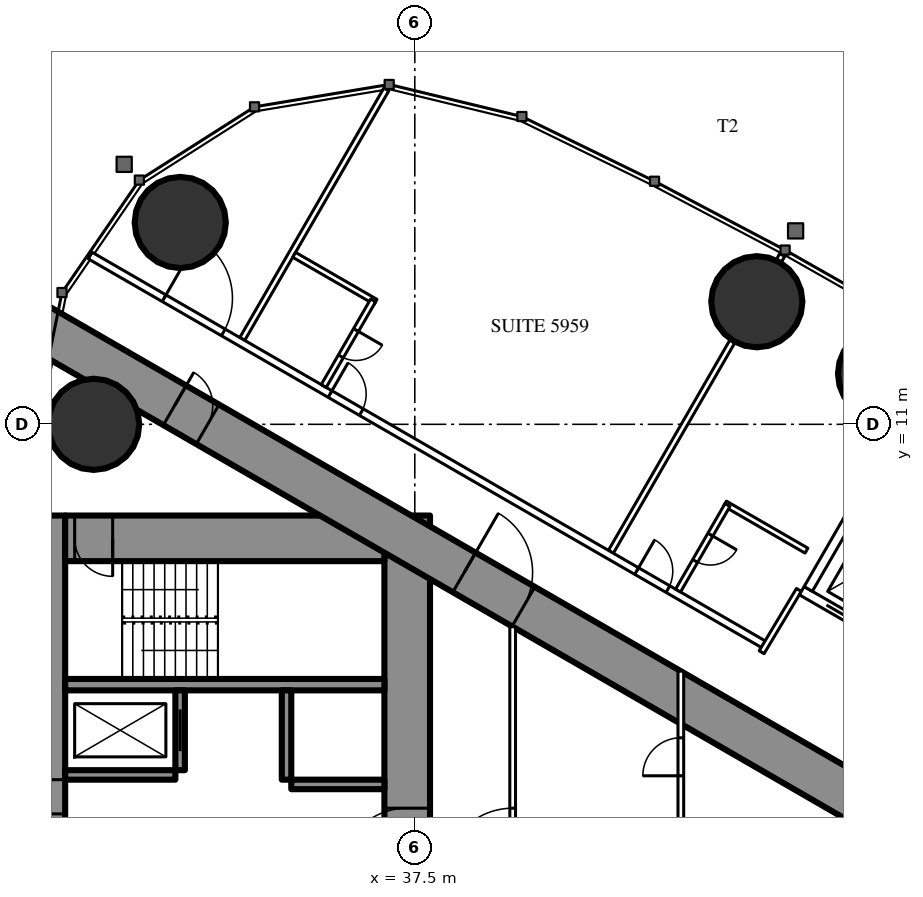
"""IFC4 building model, lengths in metres.
Left out: names, types, materials, properties, quantities, classifications, styles, units other than length and angle.
Written with IfcOpenShell. Run it as: python <this file> out.ifc"""

import sys

from ifc_helpers import new_model, si_unit, direction, frame, frame_2d, origin, origin_2d, place, context, subcontext, project, spatial, rectangle, circle, extrude, element, fill, save


model = new_model("IFC4")
c1 = context("Model", 3, precision=1e-05, world=origin(), true_north=direction((0.0, 1.0)))
c2 = subcontext(c1, "Body", "Model", "MODEL_VIEW")
j1 = project(units=[si_unit("LENGTHUNIT", "METRE"), si_unit("PLANEANGLEUNIT", "RADIAN")], contexts=[c1])
p1 = place(None, origin())
s1 = spatial("IfcSite", under=j1, at=p1, CompositionType="ELEMENT")
p2 = place(p1, origin())
s2 = spatial("IfcBuilding", under=s1, at=p2, CompositionType="ELEMENT")
p3 = place(p2, frame((0.0, 0.0, 222.5)))
s3 = spatial("IfcBuildingStorey", under=s2, at=p3, CompositionType="ELEMENT", Elevation=222.5)
for number, where, z_axis, x_axis in (
    (1, (31.328, 16.311, 0.0), (0.0, 0.0, 1.0), (1.0, 0.0, 0.0)),
    (2, (29.05, 11.0, 0.0), (0.0, 0.0, 1.0), (1.0, 0.0, 0.0)),
    (3, (49.834, 12.332, 0.0), (0.0, 0.0, 1.0), (1.0, 0.0, 0.0)),
    (4, (46.499, 14.226, 0.0), (0.0, 0.0, 1.0), (1.0, 0.0, 0.0)),
):
    element("IfcColumn", number, at=place(p3, frame(where, z_axis=z_axis, x_axis=x_axis)), inside=s3, PredefinedType="COLUMN", context=c2, shape_type="SweptSolid", body=[
        extrude(circle(Radius=1.2, at=origin_2d()), origin(), (0.0, 0.0, 1.0), 3.6),
    ])
p4 = place(p3, frame((27.9, -8.6, 0.0), z_axis=(0.0, 0.0, 1.0), x_axis=(0.0, 1.0, 0.0)))
e5 = element("IfcWall", 5, at=p4, inside=s3, PredefinedType="SHEAR", context=c2, shape_type="SweptSolid", body=[
    extrude(rectangle(XDim=17.2, YDim=0.8, at=frame_2d((8.6, 0.0))), origin(), (0.0, 0.0, 1.0), 3.6),
])
p5 = place(p4, frame((9.35, 0.0, 0.0)))
e6 = element("IfcOpeningElement", 6, at=p5, cuts=e5, PredefinedType="OPENING", context=c2, shape_type="SweptSolid", body=[
    extrude(rectangle(XDim=0.9, YDim=2.2, at=frame_2d((0.45, 1.1))), frame((0.0, 0.41, 0.0), z_axis=(0.0, -1.0, 0.0), x_axis=(1.0, 0.0, 0.0)), (0.0, 0.0, 1.0), 0.82),
])
p6 = place(p3, frame((37.3, -8.6, 0.0), z_axis=(0.0, 0.0, 1.0), x_axis=(0.0, 1.0, 0.0)))
e7 = element("IfcWall", 7, at=p6, inside=s3, PredefinedType="SHEAR", context=c2, shape_type="SweptSolid", body=[
    extrude(rectangle(XDim=17.2, YDim=1.2, at=frame_2d((8.6, 0.0))), origin(), (0.0, 0.0, 1.0), 3.6),
])
p7 = place(p6, frame((7.7, 0.0, 0.0)))
e8 = element("IfcOpeningElement", 8, at=p7, cuts=e7, PredefinedType="OPENING", context=c2, shape_type="SweptSolid", body=[
    extrude(rectangle(XDim=1.8, YDim=2.2, at=frame_2d((0.9, 1.1))), frame((0.0, 0.61, 0.0), z_axis=(0.0, -1.0, 0.0), x_axis=(1.0, 0.0, 0.0)), (0.0, 0.0, 1.0), 1.22),
])
p8 = place(p3, frame((28.3, 8.0, 0.0), z_axis=(0.0, 0.0, 1.0), x_axis=(1.0, 0.0, 0.0)))
e9 = element("IfcWall", 9, at=p8, inside=s3, PredefinedType="SHEAR", context=c2, shape_type="SweptSolid", body=[
    extrude(rectangle(XDim=8.4, YDim=1.2, at=frame_2d((4.2, 0.0))), origin(), (0.0, 0.0, 1.0), 3.6),
])
p9 = place(p8, frame((0.25, 0.0, 0.0)))
e10 = element("IfcOpeningElement", 10, at=p9, cuts=e9, PredefinedType="OPENING", context=c2, shape_type="SweptSolid", body=[
    extrude(rectangle(XDim=1.0, YDim=2.2, at=frame_2d((0.5, 1.1))), frame((0.0, 0.61, 0.0), z_axis=(0.0, -1.0, 0.0), x_axis=(1.0, 0.0, 0.0)), (0.0, 0.0, 1.0), 1.22),
])
p10 = place(p3, frame((28.3, 4.15, 0.0), z_axis=(0.0, 0.0, 1.0), x_axis=(1.0, 0.0, 0.0)))
e11 = element("IfcWall", 11, at=p10, inside=s3, PredefinedType="SHEAR", context=c2, shape_type="SweptSolid", body=[
    extrude(rectangle(XDim=8.4, YDim=0.3, at=frame_2d((4.2, 0.0))), origin(), (0.0, 0.0, 1.0), 3.6),
])
p11 = place(p3, frame((31.325, 1.9, 0.0), z_axis=(0.0, 0.0, 1.0), x_axis=(0.0, 1.0, 0.0)))
e12 = element("IfcWall", 12, at=p11, inside=s3, PredefinedType="SHEAR", context=c2, shape_type="SweptSolid", body=[
    extrude(rectangle(XDim=2.1, YDim=0.25, at=frame_2d((1.05, 0.0))), origin(), (0.0, 0.0, 1.0), 3.6),
])
p12 = place(p11, frame((0.5, 0.0, 0.0)))
e13 = element("IfcOpeningElement", 13, at=p12, cuts=e12, PredefinedType="OPENING", context=c2, shape_type="SweptSolid", body=[
    extrude(rectangle(XDim=1.1, YDim=2.2, at=frame_2d((0.55, 1.1))), frame((0.0, 0.135, 0.0), z_axis=(0.0, -1.0, 0.0), x_axis=(1.0, 0.0, 0.0)), (0.0, 0.0, 1.0), 0.27),
])
p13 = place(p3, frame((34.125, 1.65, 0.0), z_axis=(0.0, 0.0, 1.0), x_axis=(0.0, 1.0, 0.0)))
e14 = element("IfcWall", 14, at=p13, inside=s3, PredefinedType="SHEAR", context=c2, shape_type="SweptSolid", body=[
    extrude(rectangle(XDim=2.35, YDim=0.25, at=frame_2d((1.175, 0.0))), origin(), (0.0, 0.0, 1.0), 3.6),
])
p14 = place(p3, frame((28.3, 1.775, 0.0), z_axis=(0.0, 0.0, 1.0), x_axis=(1.0, 0.0, 0.0)))
e15 = element("IfcWall", 15, at=p14, inside=s3, PredefinedType="SHEAR", context=c2, shape_type="SweptSolid", body=[
    extrude(rectangle(XDim=2.9, YDim=0.25, at=frame_2d((1.45, 0.0))), origin(), (0.0, 0.0, 1.0), 3.6),
])
p15 = place(p3, frame((34.25, 1.525, 0.0), z_axis=(0.0, 0.0, 1.0), x_axis=(1.0, 0.0, 0.0)))
e16 = element("IfcWall", 16, at=p15, inside=s3, PredefinedType="SHEAR", context=c2, shape_type="SweptSolid", body=[
    extrude(rectangle(XDim=2.45, YDim=0.25, at=frame_2d((1.225, 0.0))), origin(), (0.0, 0.0, 1.0), 3.6),
])
p16 = place(p3, frame((27.2, -13.8, 0.0), z_axis=(0.0, 0.0, 1.0), x_axis=(0.866027159892, 0.499996958321, 0.0)))
e17 = element("IfcWall", 17, at=p16, inside=s3, PredefinedType="SHEAR", context=c2, shape_type="SweptSolid", body=[
    extrude(rectangle(XDim=27.947, YDim=1.2, at=frame_2d((13.973, 0.0))), origin(), (0.0, 0.0, 1.0), 3.6),
])
p17 = place(p16, frame((4.6, 0.0, 0.0)))
e18 = element("IfcOpeningElement", 18, at=p17, cuts=e17, PredefinedType="OPENING", context=c2, shape_type="SweptSolid", body=[
    extrude(rectangle(XDim=1.0, YDim=2.2, at=frame_2d((0.5, 1.1))), frame((0.0, 0.61, 0.0), z_axis=(0.0, -1.0, 0.0), x_axis=(1.0, 0.0, 0.0)), (0.0, 0.0, 1.0), 1.22),
])
p18 = place(p16, frame((13.395, 0.0, 0.0)))
e19 = element("IfcOpeningElement", 19, at=p18, cuts=e17, PredefinedType="OPENING", context=c2, shape_type="SweptSolid", body=[
    extrude(rectangle(XDim=1.8, YDim=2.2, at=frame_2d((0.9, 1.1))), frame((0.0, 0.61, 0.0), z_axis=(0.0, -1.0, 0.0), x_axis=(1.0, 0.0, 0.0)), (0.0, 0.0, 1.0), 1.22),
])
p19 = place(p3, frame((27.2, 13.8, 0.0), z_axis=(0.0, 0.0, 1.0), x_axis=(0.866024515034, -0.500001539357, 0.0)))
e20 = element("IfcWall", 20, at=p19, inside=s3, PredefinedType="SHEAR", context=c2, shape_type="SweptSolid", body=[
    extrude(rectangle(XDim=26.907, YDim=1.2, at=frame_2d((13.454, 0.0))), origin(), (0.0, 0.0, 1.0), 3.6),
])
p20 = place(p19, frame((4.6, 0.0, 0.0)))
e21 = element("IfcOpeningElement", 21, at=p20, cuts=e20, PredefinedType="OPENING", context=c2, shape_type="SweptSolid", body=[
    extrude(rectangle(XDim=1.0, YDim=2.2, at=frame_2d((0.5, 1.1))), frame((0.0, 0.61, 0.0), z_axis=(0.0, -1.0, 0.0), x_axis=(1.0, 0.0, 0.0)), (0.0, 0.0, 1.0), 1.22),
])
p21 = place(p19, frame((13.395, 0.0, 0.0)))
e22 = element("IfcOpeningElement", 22, at=p21, cuts=e20, PredefinedType="OPENING", context=c2, shape_type="SweptSolid", body=[
    extrude(rectangle(XDim=1.8, YDim=2.2, at=frame_2d((0.9, 1.1))), frame((0.0, 0.61, 0.0), z_axis=(0.0, -1.0, 0.0), x_axis=(1.0, 0.0, 0.0)), (0.0, 0.0, 1.0), 1.22),
])
p22 = place(p3, frame((32.96, 13.246, 0.0), z_axis=(0.0, 0.0, 1.0), x_axis=(0.500000236886, 0.866025267018, 0.0)))
e23 = element("IfcWall", 23, at=p22, inside=s3, PredefinedType="PARTITIONING", context=c2, shape_type="SweptSolid", body=[
    extrude(rectangle(XDim=7.583, YDim=0.15, at=frame_2d((3.791, 0.0))), origin(), (0.0, 0.0, 1.0), 3.35),
])
p23 = place(p3, frame((42.66, 7.646, 0.0), z_axis=(0.0, 0.0, 1.0), x_axis=(0.499996592859, 0.866027370889, 0.0)))
e24 = element("IfcWall", 24, at=p23, inside=s3, PredefinedType="PARTITIONING", context=c2, shape_type="SweptSolid", body=[
    extrude(rectangle(XDim=6.398, YDim=0.15, at=frame_2d((3.199, 0.0))), origin(), (0.0, 0.0, 1.0), 2.45),
])
p24 = place(p3, frame((47.079, 15.3, 0.0), z_axis=(0.0, 0.0, 1.0), x_axis=(0.499212083968, 0.866479829667, 0.0)))
e25 = element("IfcWall", 25, at=p24, inside=s3, PredefinedType="PARTITIONING", context=c2, shape_type="SweptSolid", body=[
    extrude(rectangle(XDim=0.179, YDim=0.15, at=frame_2d((0.09, 0.0))), origin(), (0.0, 0.0, 1.0), 2.45),
])
p25 = place(p3, frame((28.959, 15.44, 0.0), z_axis=(0.0, 0.0, 1.0), x_axis=(0.866028936079, -0.499993881836, 0.0)))
e26 = element("IfcWall", 26, at=p25, inside=s3, PredefinedType="PARTITIONING", context=c2, shape_type="SweptSolid", body=[
    extrude(rectangle(XDim=20.503, YDim=0.2, at=frame_2d((10.251, 0.0))), origin(), (0.0, 0.0, 1.0), 3.35),
])
p26 = place(p25, frame((16.603, 0.0, 0.0)))
e27 = element("IfcOpeningElement", 27, at=p26, cuts=e26, PredefinedType="OPENING", context=c2, shape_type="SweptSolid", body=[
    extrude(rectangle(XDim=0.95, YDim=2.2, at=frame_2d((0.475, 1.1))), frame((0.0, 0.11, 0.0), z_axis=(0.0, -1.0, 0.0), x_axis=(1.0, 0.0, 0.0)), (0.0, 0.0, 1.0), 0.22),
])
p27 = place(p25, frame((7.287, 0.0, 0.0)))
e28 = element("IfcOpeningElement", 28, at=p27, cuts=e26, PredefinedType="OPENING", context=c2, shape_type="SweptSolid", body=[
    extrude(rectangle(XDim=0.95, YDim=2.2, at=frame_2d((0.475, 1.1))), frame((0.0, 0.11, 0.0), z_axis=(0.0, -1.0, 0.0), x_axis=(1.0, 0.0, 0.0)), (0.0, 0.0, 1.0), 0.22),
])
p28 = place(p25, frame((2.244, 0.0, 0.0)))
e29 = element("IfcOpeningElement", 29, at=p28, cuts=e26, PredefinedType="OPENING", context=c2, shape_type="SweptSolid", body=[
    extrude(rectangle(XDim=1.8, YDim=2.03, at=frame_2d((0.9, 1.015))), frame((0.0, 0.11, 0.0), z_axis=(0.0, -1.0, 0.0), x_axis=(1.0, 0.0, 0.0)), (0.0, 0.0, 1.0), 0.22),
])
p29 = place(p3, frame((47.606, 6.642, 0.0), z_axis=(0.0, 0.0, 1.0), x_axis=(-0.51353662755, -0.858067673418, 0.0)))
e30 = element("IfcWall", 30, at=p29, inside=s3, PredefinedType="PARTITIONING", context=c2, shape_type="SweptSolid", body=[
    extrude(rectangle(XDim=1.91, YDim=0.15, at=frame_2d((0.955, 0.0))), origin(), (0.0, 0.0, 1.0), 3.35),
])
p30 = place(p3, frame((45.662, 8.914, 0.0), z_axis=(0.0, 0.0, 1.0), x_axis=(0.86604923931, -0.499958713387, 0.0)))
e31 = element("IfcWall", 31, at=p30, inside=s3, PredefinedType="PARTITIONING", context=c2, shape_type="SweptSolid", body=[
    extrude(rectangle(XDim=2.475, YDim=0.15, at=frame_2d((1.237, 0.0))), origin(), (0.0, 0.0, 1.0), 3.35),
])
p31 = place(p3, frame((44.427, 6.625, 0.0), z_axis=(0.0, 0.0, 1.0), x_axis=(0.500006934395, 0.866021400173, 0.0)))
e32 = element("IfcWall", 32, at=p31, inside=s3, PredefinedType="PARTITIONING", context=c2, shape_type="SweptSolid", body=[
    extrude(rectangle(XDim=2.6, YDim=0.15, at=frame_2d((1.3, 0.0))), origin(), (0.0, 0.0, 1.0), 3.35),
])
p32 = place(p31, frame((0.9, 0.0, 0.0)))
e33 = element("IfcOpeningElement", 33, at=p32, cuts=e32, PredefinedType="OPENING", context=c2, shape_type="SweptSolid", body=[
    extrude(rectangle(XDim=0.8, YDim=2.2, at=frame_2d((0.4, 1.1))), frame((0.0, 0.085, 0.0), z_axis=(0.0, -1.0, 0.0), x_axis=(1.0, 0.0, 0.0)), (0.0, 0.0, 1.0), 0.17),
])
p33 = place(p3, frame((34.325, 15.46, 0.0), z_axis=(0.0, 0.0, 1.0), x_axis=(0.866031185235, -0.4999899861, 0.0)))
e34 = element("IfcWall", 34, at=p33, inside=s3, PredefinedType="PARTITIONING", context=c2, shape_type="SweptSolid", body=[
    extrude(rectangle(XDim=2.475, YDim=0.15, at=frame_2d((1.238, 0.0))), origin(), (0.0, 0.0, 1.0), 3.35),
])
p34 = place(p3, frame((35.104, 12.008, 0.0), z_axis=(0.0, 0.0, 1.0), x_axis=(0.500047596559, 0.865997922154, 0.0)))
e35 = element("IfcWall", 35, at=p34, inside=s3, PredefinedType="PARTITIONING", context=c2, shape_type="SweptSolid", body=[
    extrude(rectangle(XDim=2.6, YDim=0.15, at=frame_2d((1.3, 0.0))), origin(), (0.0, 0.0, 1.0), 3.35),
])
p35 = place(p34, frame((0.9, 0.0, 0.0)))
e36 = element("IfcOpeningElement", 36, at=p35, cuts=e35, PredefinedType="OPENING", context=c2, shape_type="SweptSolid", body=[
    extrude(rectangle(XDim=0.8, YDim=2.2, at=frame_2d((0.4, 1.1))), frame((0.0, 0.085, 0.0), z_axis=(0.0, -1.0, 0.0), x_axis=(1.0, 0.0, 0.0)), (0.0, 0.0, 1.0), 0.17),
])
p36 = place(p3, frame((40.075, -5.674, 0.0), z_axis=(0.0, 0.0, 1.0), x_axis=(0.0, 1.0, 0.0)))
e37 = element("IfcWall", 37, at=p36, inside=s3, PredefinedType="PARTITIONING", context=c2, shape_type="SweptSolid", body=[
    extrude(rectangle(XDim=11.348, YDim=0.15, at=frame_2d((5.674, 0.0))), origin(), (0.0, 0.0, 1.0), 3.35),
])
p37 = place(p36, frame((4.774, 0.0, 0.0)))
e38 = element("IfcOpeningElement", 38, at=p37, cuts=e37, PredefinedType="OPENING", context=c2, shape_type="SweptSolid", body=[
    extrude(rectangle(XDim=1.8, YDim=2.2, at=frame_2d((0.9, 1.1))), frame((0.0, 0.085, 0.0), z_axis=(0.0, -1.0, 0.0), x_axis=(1.0, 0.0, 0.0)), (0.0, 0.0, 1.0), 0.17),
])
p38 = place(p3, frame((44.5, -4.505, 0.0), z_axis=(0.0, 0.0, 1.0), x_axis=(0.0, 1.0, 0.0)))
e39 = element("IfcWall", 39, at=p38, inside=s3, PredefinedType="PARTITIONING", context=c2, shape_type="SweptSolid", body=[
    extrude(rectangle(XDim=9.009, YDim=0.15, at=frame_2d((4.505, 0.0))), origin(), (0.0, 0.0, 1.0), 3.35),
])
p39 = place(p38, frame((1.752, 0.0, 0.0)))
e40 = element("IfcOpeningElement", 40, at=p39, cuts=e39, PredefinedType="OPENING", context=c2, shape_type="SweptSolid", body=[
    extrude(rectangle(XDim=1.0, YDim=2.2, at=frame_2d((0.5, 1.1))), frame((0.0, 0.085, 0.0), z_axis=(0.0, -1.0, 0.0), x_axis=(1.0, 0.0, 0.0)), (0.0, 0.0, 1.0), 0.17),
])
p40 = place(p38, frame((6.257, 0.0, 0.0)))
e41 = element("IfcOpeningElement", 41, at=p40, cuts=e39, PredefinedType="OPENING", context=c2, shape_type="SweptSolid", body=[
    extrude(rectangle(XDim=1.0, YDim=2.2, at=frame_2d((0.5, 1.1))), frame((0.0, 0.085, 0.0), z_axis=(0.0, -1.0, 0.0), x_axis=(1.0, 0.0, 0.0)), (0.0, 0.0, 1.0), 0.17),
])
p41 = place(p3, frame((47.681, 6.622, 0.0), z_axis=(0.0, 0.0, 1.0), x_axis=(0.86603344179, -0.499986077507, 0.0)))
e42 = element("IfcWall", 42, at=p41, inside=s3, PredefinedType="PARTITIONING", context=c2, shape_type="SweptSolid", body=[
    extrude(rectangle(XDim=6.6, YDim=0.25, at=frame_2d((3.3, 0.0))), origin(), (0.0, 0.0, 1.0), 3.35),
])
p42 = place(p41, frame((0.75, 0.0, 0.0)))
e43 = element("IfcOpeningElement", 43, at=p42, cuts=e42, PredefinedType="OPENING", context=c2, shape_type="SweptSolid", body=[
    extrude(rectangle(XDim=1.1, YDim=2.2, at=frame_2d((0.55, 1.1))), frame((0.0, 0.135, 0.0), z_axis=(0.0, -1.0, 0.0), x_axis=(1.0, 0.0, 0.0)), (0.0, 0.0, 1.0), 0.27),
])
p43 = place(p41, frame((2.75, 0.0, 0.0)))
e44 = element("IfcOpeningElement", 44, at=p43, cuts=e42, PredefinedType="OPENING", context=c2, shape_type="SweptSolid", body=[
    extrude(rectangle(XDim=1.1, YDim=2.2, at=frame_2d((0.55, 1.1))), frame((0.0, 0.135, 0.0), z_axis=(0.0, -1.0, 0.0), x_axis=(1.0, 0.0, 0.0)), (0.0, 0.0, 1.0), 0.27),
])
p44 = place(p41, frame((4.75, 0.0, 0.0)))
e45 = element("IfcOpeningElement", 45, at=p44, cuts=e42, PredefinedType="OPENING", context=c2, shape_type="SweptSolid", body=[
    extrude(rectangle(XDim=1.1, YDim=2.2, at=frame_2d((0.55, 1.1))), frame((0.0, 0.135, 0.0), z_axis=(0.0, -1.0, 0.0), x_axis=(1.0, 0.0, 0.0)), (0.0, 0.0, 1.0), 0.27),
])
p45 = place(p3, frame((47.852, 6.668, 0.0), z_axis=(0.0, 0.0, 1.0), x_axis=(0.499929347863, 0.866066190972, 0.0)))
e46 = element("IfcWall", 46, at=p45, inside=s3, PredefinedType="PARTITIONING", context=c2, shape_type="SweptSolid", body=[
    extrude(rectangle(XDim=3.201, YDim=0.25, at=frame_2d((1.6, 0.0))), origin(), (0.0, 0.0, 1.0), 3.35),
])
p46 = place(p32, origin())
e47 = element("IfcDoor", 47, at=p46, inside=s3, OperationType="SINGLE_SWING_RIGHT", PredefinedType="DOOR", context=c2, shape_type="SweptSolid", body=[
    extrude(rectangle(XDim=0.8, YDim=2.2, at=frame_2d((0.4, 1.1))), frame((0.0, 0.025, 0.0), z_axis=(0.0, -1.0, 0.0), x_axis=(1.0, 0.0, 0.0)), (0.0, 0.0, 1.0), 0.05),
])
fill(e33, e47)
p47 = place(p26, origin())
e48 = element("IfcDoor", 48, at=p47, inside=s3, OperationType="SINGLE_SWING_LEFT", PredefinedType="DOOR", context=c2, shape_type="SweptSolid", body=[
    extrude(rectangle(XDim=0.95, YDim=2.2, at=frame_2d((0.475, 1.1))), frame((0.0, 0.025, 0.0), z_axis=(0.0, -1.0, 0.0), x_axis=(1.0, 0.0, 0.0)), (0.0, 0.0, 1.0), 0.05),
])
fill(e27, e48)
p48 = place(p35, origin())
e49 = element("IfcDoor", 49, at=p48, inside=s3, OperationType="SINGLE_SWING_RIGHT", PredefinedType="DOOR", context=c2, shape_type="SweptSolid", body=[
    extrude(rectangle(XDim=0.8, YDim=2.2, at=frame_2d((0.4, 1.1))), frame((0.0, 0.025, 0.0), z_axis=(0.0, -1.0, 0.0), x_axis=(1.0, 0.0, 0.0)), (0.0, 0.0, 1.0), 0.05),
])
fill(e36, e49)
p49 = place(p27, origin())
e50 = element("IfcDoor", 50, at=p49, inside=s3, OperationType="SINGLE_SWING_LEFT", PredefinedType="DOOR", context=c2, shape_type="SweptSolid", body=[
    extrude(rectangle(XDim=0.95, YDim=2.2, at=frame_2d((0.475, 1.1))), frame((0.0, 0.025, 0.0), z_axis=(0.0, -1.0, 0.0), x_axis=(1.0, 0.0, 0.0)), (0.0, 0.0, 1.0), 0.05),
])
fill(e28, e50)
p50 = place(p28, origin())
e51 = element("IfcDoor", 51, at=p50, inside=s3, OperationType="DOUBLE_DOOR_SINGLE_SWING", PredefinedType="DOOR", context=c2, shape_type="SweptSolid", body=[
    extrude(rectangle(XDim=1.8, YDim=2.03, at=frame_2d((0.9, 1.015))), frame((0.0, 0.025, 0.0), z_axis=(0.0, -1.0, 0.0), x_axis=(1.0, 0.0, 0.0)), (0.0, 0.0, 1.0), 0.05),
])
fill(e29, e51)
p51 = place(p37, origin())
e52 = element("IfcDoor", 52, at=p51, inside=s3, OperationType="DOUBLE_DOOR_SINGLE_SWING", PredefinedType="DOOR", context=c2, shape_type="SweptSolid", body=[
    extrude(rectangle(XDim=1.8, YDim=2.2, at=frame_2d((0.9, 1.1))), frame((0.0, 0.025, 0.0), z_axis=(0.0, -1.0, 0.0), x_axis=(1.0, 0.0, 0.0)), (0.0, 0.0, 1.0), 0.05),
])
fill(e38, e52)
p52 = place(p40, origin())
e53 = element("IfcDoor", 53, at=p52, inside=s3, OperationType="SINGLE_SWING_LEFT", PredefinedType="DOOR", context=c2, shape_type="SweptSolid", body=[
    extrude(rectangle(XDim=1.0, YDim=2.2, at=frame_2d((0.5, 1.1))), frame((0.0, 0.025, 0.0), z_axis=(0.0, -1.0, 0.0), x_axis=(1.0, 0.0, 0.0)), (0.0, 0.0, 1.0), 0.05),
])
fill(e41, e53)
p53 = place(p20, origin())
e54 = element("IfcDoor", 54, at=p53, inside=s3, OperationType="SINGLE_SWING_LEFT", PredefinedType="DOOR", context=c2, shape_type="SweptSolid", body=[
    extrude(rectangle(XDim=1.0, YDim=2.2, at=frame_2d((0.5, 1.1))), frame((0.0, 0.025, 0.0), z_axis=(0.0, -1.0, 0.0), x_axis=(1.0, 0.0, 0.0)), (0.0, 0.0, 1.0), 0.05),
])
fill(e21, e54)
p54 = place(p21, origin())
e55 = element("IfcDoor", 55, at=p54, inside=s3, OperationType="DOUBLE_DOOR_SINGLE_SWING", PredefinedType="DOOR", context=c2, shape_type="SweptSolid", body=[
    extrude(rectangle(XDim=1.8, YDim=2.2, at=frame_2d((0.9, 1.1))), frame((0.0, 0.025, 0.0), z_axis=(0.0, -1.0, 0.0), x_axis=(1.0, 0.0, 0.0)), (0.0, 0.0, 1.0), 0.05),
])
fill(e22, e55)
p55 = place(p7, origin())
e56 = element("IfcDoor", 56, at=p55, inside=s3, OperationType="DOUBLE_DOOR_SINGLE_SWING", PredefinedType="DOOR", context=c2, shape_type="SweptSolid", body=[
    extrude(rectangle(XDim=1.8, YDim=2.2, at=frame_2d((0.9, 1.1))), frame((0.0, 0.025, 0.0), z_axis=(0.0, -1.0, 0.0), x_axis=(1.0, 0.0, 0.0)), (0.0, 0.0, 1.0), 0.05),
])
fill(e8, e56)
p56 = place(p9, origin())
e57 = element("IfcDoor", 57, at=p56, inside=s3, OperationType="SINGLE_SWING_RIGHT", PredefinedType="DOOR", context=c2, shape_type="SweptSolid", body=[
    extrude(rectangle(XDim=1.0, YDim=2.2, at=frame_2d((0.5, 1.1))), frame((0.0, 0.025, 0.0), z_axis=(0.0, -1.0, 0.0), x_axis=(1.0, 0.0, 0.0)), (0.0, 0.0, 1.0), 0.05),
])
fill(e10, e57)
p57 = place(p12, origin())
e58 = element("IfcDoor", 58, at=p57, inside=s3, OperationType="SLIDING_TO_LEFT", PredefinedType="USERDEFINED", context=c2, shape_type="SweptSolid", body=[
    extrude(rectangle(XDim=1.1, YDim=2.2, at=frame_2d((0.55, 1.1))), frame((0.0, 0.025, 0.0), z_axis=(0.0, -1.0, 0.0), x_axis=(1.0, 0.0, 0.0)), (0.0, 0.0, 1.0), 0.05),
])
fill(e13, e58)
p58 = place(p42, origin())
e59 = element("IfcDoor", 59, at=p58, inside=s3, OperationType="DOUBLE_DOOR_SLIDING", PredefinedType="USERDEFINED", context=c2, shape_type="SweptSolid", body=[
    extrude(rectangle(XDim=1.1, YDim=2.2, at=frame_2d((0.55, 1.1))), frame((0.0, 0.025, 0.0), z_axis=(0.0, -1.0, 0.0), x_axis=(1.0, 0.0, 0.0)), (0.0, 0.0, 1.0), 0.05),
])
fill(e43, e59)
save(model, sys.argv[1])
